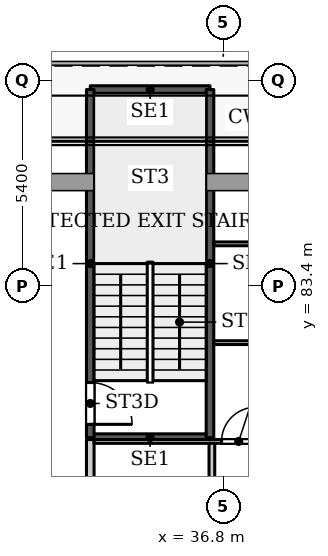
"""IFC4 building model, lengths in metres.
Left out: names, types, materials, properties, quantities, classifications, styles, units other than length and angle.
Written with IfcOpenShell. Run it as: python <this file> out.ifc"""

import sys

from ifc_helpers import new_model, si_unit, direction, frame, frame_2d, origin, place, context, subcontext, project, spatial, rectangle, extrude, source, transform, mapped, element, fill, save


model = new_model("IFC4")
c1 = context("Model", 3, precision=1e-05, world=origin(), true_north=direction((0.0, 1.0)))
c2 = subcontext(c1, "Body", "Model", "MODEL_VIEW")
j1 = project(units=[si_unit("LENGTHUNIT", "METRE"), si_unit("PLANEANGLEUNIT", "RADIAN")], contexts=[c1])
p1 = place(None, origin())
s1 = spatial("IfcSite", under=j1, at=p1, CompositionType="ELEMENT")
p2 = place(p1, origin())
s2 = spatial("IfcBuilding", under=s1, at=p2, CompositionType="ELEMENT")
p3 = place(p2, frame((0.0, 0.0, 101.9)))
s3 = spatial("IfcBuildingStorey", under=s2, at=p3, CompositionType="ELEMENT", Elevation=101.9)
for number, where, z_axis, x_axis in (
    (1, (33.3, 79.4, 0.0), (0.0, 0.0, 1.0), (1.0, 0.0, 0.0)),
    (2, (33.3, 88.56, 0.0), (0.0, 0.0, 1.0), (1.0, 0.0, 0.0)),
):
    element("IfcWall", number, at=place(p3, frame(where, z_axis=z_axis, x_axis=x_axis)), inside=s3, PredefinedType="SHEAR", context=c2, shape_type="SweptSolid", body=[
        extrude(rectangle(XDim=3.15, YDim=0.2, at=frame_2d((1.575, 0.0))), origin(), (0.0, 0.0, 1.0), 3.9),
    ])
p4 = place(p3, frame((33.3, 79.4, 0.0), z_axis=(0.0, 0.0, 1.0), x_axis=(0.0, 1.0, 0.0)))
e3 = element("IfcWall", 3, at=p4, inside=s3, PredefinedType="SHEAR", context=c2, shape_type="SweptSolid", body=[
    extrude(rectangle(XDim=9.16, YDim=0.2, at=frame_2d((4.58, 0.0))), origin(), (0.0, 0.0, 1.0), 3.9),
])
p5 = place(p4, frame((0.35, 0.0, 0.0)))
e4 = element("IfcOpeningElement", 4, at=p5, cuts=e3, PredefinedType="OPENING", context=c2, shape_type="SweptSolid", body=[
    extrude(rectangle(XDim=1.1, YDim=2.2, at=frame_2d((0.55, 1.1))), frame((0.0, 0.11, 0.0), z_axis=(0.0, -1.0, 0.0), x_axis=(1.0, 0.0, 0.0)), (0.0, 0.0, 1.0), 0.22),
])
p6 = place(p3, frame((36.45, 79.4, 0.0), z_axis=(0.0, 0.0, 1.0), x_axis=(0.0, 1.0, 0.0)))
e5 = element("IfcWall", 5, at=p6, inside=s3, PredefinedType="SHEAR", context=c2, shape_type="SweptSolid", body=[
    extrude(rectangle(XDim=9.16, YDim=0.2, at=frame_2d((4.58, 0.0))), origin(), (0.0, 0.0, 1.0), 3.9),
])
p7 = place(p3, frame((33.3, 54.4, 0.0), z_axis=(0.0, 0.0, 1.0), x_axis=(0.0, 1.0, 0.0)))
e6 = element("IfcWall", 6, at=p7, inside=s3, PredefinedType="PARTITIONING", context=c2, shape_type="SweptSolid", body=[
    extrude(rectangle(XDim=24.95, YDim=0.2, at=frame_2d((12.475, 0.0))), origin(), (0.0, 0.0, 1.0), 3.6),
])
p8 = place(p7, frame((0.4, 0.0, 0.0)))
e7 = element("IfcOpeningElement", 7, at=p8, cuts=e6, PredefinedType="OPENING", context=c2, shape_type="SweptSolid", body=[
    extrude(rectangle(XDim=1.0, YDim=2.1, at=frame_2d((0.5, 1.05))), frame((0.0, 0.11, 0.0), z_axis=(0.0, -1.0, 0.0), x_axis=(1.0, 0.0, 0.0)), (0.0, 0.0, 1.0), 0.22),
])
p9 = place(p7, frame((13.75, 0.0, 0.0)))
e8 = element("IfcOpeningElement", 8, at=p9, cuts=e6, PredefinedType="OPENING", context=c2, shape_type="SweptSolid", body=[
    extrude(rectangle(XDim=1.0, YDim=2.1, at=frame_2d((0.5, 1.05))), frame((0.0, 0.11, 0.0), z_axis=(0.0, -1.0, 0.0), x_axis=(1.0, 0.0, 0.0)), (0.0, 0.0, 1.0), 0.22),
])
p10 = place(p3, frame((33.4, 79.3, 0.0), z_axis=(0.0, 0.0, 1.0), x_axis=(1.0, 0.0, 0.0)))
e9 = element("IfcWall", 9, at=p10, inside=s3, PredefinedType="PARTITIONING", context=c2, shape_type="SweptSolid", body=[
    extrude(rectangle(XDim=12.5, YDim=0.1, at=frame_2d((6.25, 0.0))), origin(), (0.0, 0.0, 1.0), 3.6),
])
p11 = place(p10, frame((3.355, 0.0, 0.0)))
e10 = element("IfcOpeningElement", 10, at=p11, cuts=e9, PredefinedType="OPENING", context=c2, shape_type="SweptSolid", body=[
    extrude(rectangle(XDim=0.9, YDim=2.1, at=frame_2d((0.45, 1.05))), frame((0.0, 0.06, 0.0), z_axis=(0.0, -1.0, 0.0), x_axis=(1.0, 0.0, 0.0)), (0.0, 0.0, 1.0), 0.12),
])
p12 = place(p3, frame((36.5, 69.625, 0.0), z_axis=(0.0, 0.0, 1.0), x_axis=(0.0, 1.0, 0.0)))
e11 = element("IfcWall", 11, at=p12, inside=s3, PredefinedType="PARTITIONING", context=c2, shape_type="SweptSolid", body=[
    extrude(rectangle(XDim=9.625, YDim=0.15, at=frame_2d((4.812, 0.0))), origin(), (0.0, 0.0, 1.0), 3.6),
])
p13 = place(p12, frame((2.675, 0.0, 0.0)))
e12 = element("IfcOpeningElement", 12, at=p13, cuts=e11, PredefinedType="OPENING", context=c2, shape_type="SweptSolid", body=[
    extrude(rectangle(XDim=0.8, YDim=2.1, at=frame_2d((0.4, 1.05))), frame((0.0, 0.085, 0.0), z_axis=(0.0, -1.0, 0.0), x_axis=(1.0, 0.0, 0.0)), (0.0, 0.0, 1.0), 0.17),
])
p14 = place(p12, frame((7.425, 0.0, 0.0)))
e13 = element("IfcOpeningElement", 13, at=p14, cuts=e11, PredefinedType="OPENING", context=c2, shape_type="SweptSolid", body=[
    extrude(rectangle(XDim=0.9, YDim=2.1, at=frame_2d((0.45, 1.05))), frame((0.0, 0.085, 0.0), z_axis=(0.0, -1.0, 0.0), x_axis=(1.0, 0.0, 0.0)), (0.0, 0.0, 1.0), 0.17),
])
p15 = place(p12, frame((4.775, 0.0, 0.0)))
e14 = element("IfcOpeningElement", 14, at=p15, cuts=e11, PredefinedType="OPENING", context=c2, shape_type="SweptSolid", body=[
    extrude(rectangle(XDim=0.8, YDim=2.1, at=frame_2d((0.4, 1.05))), frame((0.0, 0.085, 0.0), z_axis=(0.0, -1.0, 0.0), x_axis=(1.0, 0.0, 0.0)), (0.0, 0.0, 1.0), 0.17),
])
p16 = place(p12, frame((0.575, 0.0, 0.0)))
e15 = element("IfcOpeningElement", 15, at=p16, cuts=e11, PredefinedType="OPENING", context=c2, shape_type="SweptSolid", body=[
    extrude(rectangle(XDim=0.8, YDim=2.1, at=frame_2d((0.4, 1.05))), frame((0.0, 0.085, 0.0), z_axis=(0.0, -1.0, 0.0), x_axis=(1.0, 0.0, 0.0)), (0.0, 0.0, 1.0), 0.17),
])
p17 = place(p3, frame((36.549, 81.9, 0.0), z_axis=(0.0, 0.0, 1.0), x_axis=(1.0, 0.0, 0.0)))
e16 = element("IfcWall", 16, at=p17, inside=s3, PredefinedType="PARTITIONING", context=c2, shape_type="SweptSolid", body=[
    extrude(rectangle(XDim=9.351, YDim=0.1, at=frame_2d((4.675, 0.0))), origin(), (0.0, 0.0, 1.0), 3.6),
])
p18 = place(p17, frame((4.176, 0.0, 0.0)))
e17 = element("IfcOpeningElement", 17, at=p18, cuts=e16, PredefinedType="OPENING", context=c2, shape_type="SweptSolid", body=[
    extrude(rectangle(XDim=0.9, YDim=2.1, at=frame_2d((0.45, 1.05))), frame((0.0, 0.06, 0.0), z_axis=(0.0, -1.0, 0.0), x_axis=(1.0, 0.0, 0.0)), (0.0, 0.0, 1.0), 0.12),
])
p19 = place(p3, frame((36.549, 84.5, 0.0), z_axis=(0.0, 0.0, 1.0), x_axis=(1.0, 0.0, 0.0)))
e18 = element("IfcWall", 18, at=p19, inside=s3, PredefinedType="PARTITIONING", context=c2, shape_type="SweptSolid", body=[
    extrude(rectangle(XDim=9.351, YDim=0.1, at=frame_2d((4.675, 0.0))), origin(), (0.0, 0.0, 1.0), 3.6),
])
p20 = place(p19, frame((4.176, 0.0, 0.0)))
e19 = element("IfcOpeningElement", 19, at=p20, cuts=e18, PredefinedType="OPENING", context=c2, shape_type="SweptSolid", body=[
    extrude(rectangle(XDim=0.9, YDim=2.1, at=frame_2d((0.45, 1.05))), frame((0.0, 0.06, 0.0), z_axis=(0.0, -1.0, 0.0), x_axis=(1.0, 0.0, 0.0)), (0.0, 0.0, 1.0), 0.12),
])
m1 = source(origin(), c2, "Body", "SweptSolid", [
    extrude(rectangle(XDim=1.1, YDim=2.2, at=frame_2d((0.55, 1.1))), frame((0.0, 0.025, 0.0), z_axis=(0.0, -1.0, 0.0), x_axis=(1.0, 0.0, 0.0)), (0.0, 0.0, 1.0), 0.05),
])
p21 = place(p5, origin())
e20 = element("IfcDoor", 20, at=p21, inside=s3, OperationType="SINGLE_SWING_RIGHT", PredefinedType="DOOR", context=c2, shape_type="MappedRepresentation", body=[
    mapped(m1, transform((0.0, 0.0, 0.0), x_axis=(1.0, 0.0, 0.0), y_axis=(0.0, 1.0, 0.0), z_axis=(0.0, 0.0, 1.0), scale=1.0)),
])
fill(e4, e20)
m2 = source(origin(), c2, "Body", "SweptSolid", [
    extrude(rectangle(XDim=0.9, YDim=2.1, at=frame_2d((0.45, 1.05))), frame((0.0, 0.025, 0.0), z_axis=(0.0, -1.0, 0.0), x_axis=(1.0, 0.0, 0.0)), (0.0, 0.0, 1.0), 0.05),
])
p22 = place(p11, origin())
e21 = element("IfcDoor", 21, at=p22, inside=s3, OperationType="SINGLE_SWING_LEFT", PredefinedType="DOOR", context=c2, shape_type="MappedRepresentation", body=[
    mapped(m2, transform((0.0, 0.0, 0.0), x_axis=(1.0, 0.0, 0.0), y_axis=(0.0, 1.0, 0.0), z_axis=(0.0, 0.0, 1.0), scale=1.0)),
])
fill(e10, e21)
save(model, sys.argv[1])
